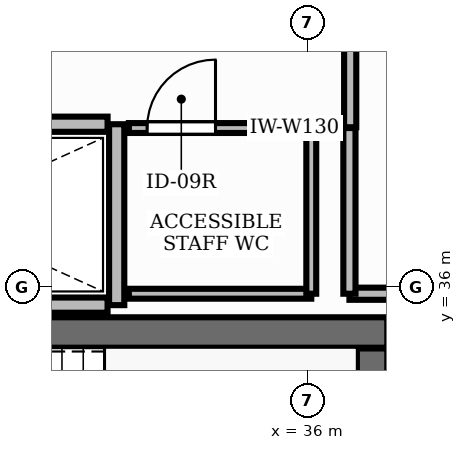
"""IFC4 building model, lengths in metres.
Left out: names, types, materials, properties, quantities, classifications, styles, units other than length and angle.
Written with IfcOpenShell. Run it as: python <this file> out.ifc"""

import sys

from ifc_helpers import new_model, si_unit, direction, frame, frame_2d, origin, place, context, subcontext, project, spatial, rectangle, extrude, element, fill, save


model = new_model("IFC4")
c1 = context("Model", 3, precision=1e-05, world=origin(), true_north=direction((0.0, 1.0)))
c2 = subcontext(c1, "Body", "Model", "MODEL_VIEW")
j1 = project(units=[si_unit("LENGTHUNIT", "METRE"), si_unit("PLANEANGLEUNIT", "RADIAN")], contexts=[c1])
p1 = place(None, origin())
s1 = spatial("IfcSite", under=j1, at=p1, CompositionType="ELEMENT")
p2 = place(p1, origin())
s2 = spatial("IfcBuilding", under=s1, at=p2, CompositionType="ELEMENT")
p3 = place(p2, frame((0.0, 0.0, 179.4)))
s3 = spatial("IfcBuildingStorey", under=s2, at=p3, CompositionType="ELEMENT", Elevation=179.4)
p4 = place(p3, frame((28.852, 35.4, 0.0), z_axis=(0.0, 0.0, 1.0), x_axis=(1.0, 0.0, 0.0)))
e1 = element("IfcWall", 1, at=p4, inside=s3, PredefinedType="SHEAR", context=c2, shape_type="SweptSolid", body=[
    extrude(rectangle(XDim=8.198, YDim=0.4, at=frame_2d((4.099, 0.0))), origin(), (0.0, 0.0, 1.0), 3.9),
])
p5 = place(p3, frame((36.85, 32.11, 0.0), z_axis=(0.0, 0.0, 1.0), x_axis=(0.0, 1.0, 0.0)))
e2 = element("IfcWall", 2, at=p5, inside=s3, PredefinedType="SHEAR", context=c2, shape_type="SweptSolid", body=[
    extrude(rectangle(XDim=3.08, YDim=0.4, at=frame_2d((1.54, 0.0))), origin(), (0.0, 0.0, 1.0), 3.9),
])
p6 = place(p3, frame((33.49, 35.76, 0.0), z_axis=(0.0, 0.0, 1.0), x_axis=(0.0, 1.0, 0.0)))
e3 = element("IfcWall", 3, at=p6, inside=s3, PredefinedType="PARTITIONING", context=c2, shape_type="SweptSolid", body=[
    extrude(rectangle(XDim=2.38, YDim=0.2, at=frame_2d((1.19, 0.0))), origin(), (0.0, 0.0, 1.0), 2.91),
])
for number, where, z_axis, x_axis in (
    (4, (28.8, 35.76, 0.0), (0.0, 0.0, 1.0), (1.0, 0.0, 0.0)),
    (5, (28.8, 38.14, 0.0), (0.0, 0.0, 1.0), (1.0, 0.0, 0.0)),
):
    element("IfcWall", number, at=place(p3, frame(where, z_axis=z_axis, x_axis=x_axis)), inside=s3, PredefinedType="PARTITIONING", context=c2, shape_type="SweptSolid", body=[
        extrude(rectangle(XDim=4.57, YDim=0.2, at=frame_2d((2.285, 0.0))), origin(), (0.0, 0.0, 1.0), 2.91),
    ])
p7 = place(p3, frame((33.65, 38.09, 0.0), z_axis=(0.0, 0.0, 1.0), x_axis=(1.0, 0.0, 0.0)))
e6 = element("IfcWall", 6, at=p7, inside=s3, PredefinedType="PARTITIONING", context=c2, shape_type="SweptSolid", body=[
    extrude(rectangle(XDim=2.4, YDim=0.13, at=frame_2d((1.2, 0.0))), origin(), (0.0, 0.0, 1.0), 2.91),
])
p8 = place(p7, frame((0.24, 0.0, 0.0)))
e7 = element("IfcOpeningElement", 7, at=p8, cuts=e6, PredefinedType="OPENING", context=c2, shape_type="SweptSolid", body=[
    extrude(rectangle(XDim=0.9, YDim=2.15, at=frame_2d((0.45, 1.075))), frame((0.0, 0.08, 0.0), z_axis=(0.0, -1.0, 0.0), x_axis=(1.0, 0.0, 0.0)), (0.0, 0.0, 1.0), 0.16),
])
p9 = place(p3, frame((36.05, 35.91, 0.0), z_axis=(0.0, 0.0, 1.0), x_axis=(-1.0, 0.0, 0.0)))
e8 = element("IfcWall", 8, at=p9, inside=s3, PredefinedType="PARTITIONING", context=c2, shape_type="SweptSolid", body=[
    extrude(rectangle(XDim=2.4, YDim=0.13, at=frame_2d((1.2, 0.0))), origin(), (0.0, 0.0, 1.0), 2.91),
])
p10 = place(p3, frame((36.05, 38.09, 0.0), z_axis=(0.0, 0.0, 1.0), x_axis=(0.0, -1.0, 0.0)))
e9 = element("IfcWall", 9, at=p10, inside=s3, PredefinedType="PARTITIONING", context=c2, shape_type="SweptSolid", body=[
    extrude(rectangle(XDim=2.18, YDim=0.13, at=frame_2d((1.09, 0.0))), origin(), (0.0, 0.0, 1.0), 2.91),
])
p11 = place(p3, frame((37.35, 35.91, 0.0), z_axis=(0.0, 0.0, 1.0), x_axis=(-1.0, 0.0, 0.0)))
e10 = element("IfcWall", 10, at=p11, inside=s3, PredefinedType="PARTITIONING", context=c2, shape_type="SweptSolid", body=[
    extrude(rectangle(XDim=0.798, YDim=0.16, at=frame_2d((0.399, 0.0))), origin(), (0.0, 0.0, 1.0), 2.91),
])
p12 = place(p3, frame((36.552, 35.91, 0.0), z_axis=(0.0, 0.0, 1.0), x_axis=(0.0, 1.0, 0.0)))
e11 = element("IfcWall", 11, at=p12, inside=s3, PredefinedType="PARTITIONING", context=c2, shape_type="SweptSolid", body=[
    extrude(rectangle(XDim=2.18, YDim=0.16, at=frame_2d((1.09, 0.0))), origin(), (0.0, 0.0, 1.0), 2.91),
])
p13 = place(p3, frame((36.562, 38.1, 0.0), z_axis=(0.0, 0.0, 1.0), x_axis=(0.0, 1.0, 0.0)))
e12 = element("IfcWall", 12, at=p13, inside=s3, PredefinedType="PARTITIONING", context=c2, shape_type="SweptSolid", body=[
    extrude(rectangle(XDim=2.55, YDim=0.16, at=frame_2d((1.275, 0.0))), origin(), (0.0, 0.0, 1.0), 2.91),
])
p14 = place(p8, origin())
e13 = element("IfcDoor", 13, at=p14, inside=s3, OperationType="SINGLE_SWING_RIGHT", PredefinedType="DOOR", context=c2, shape_type="SweptSolid", body=[
    extrude(rectangle(XDim=0.9, YDim=2.15, at=frame_2d((0.45, 1.075))), frame((0.0, 0.025, 0.0), z_axis=(0.0, -1.0, 0.0), x_axis=(1.0, 0.0, 0.0)), (0.0, 0.0, 1.0), 0.05),
])
fill(e7, e13)
save(model, sys.argv[1])
